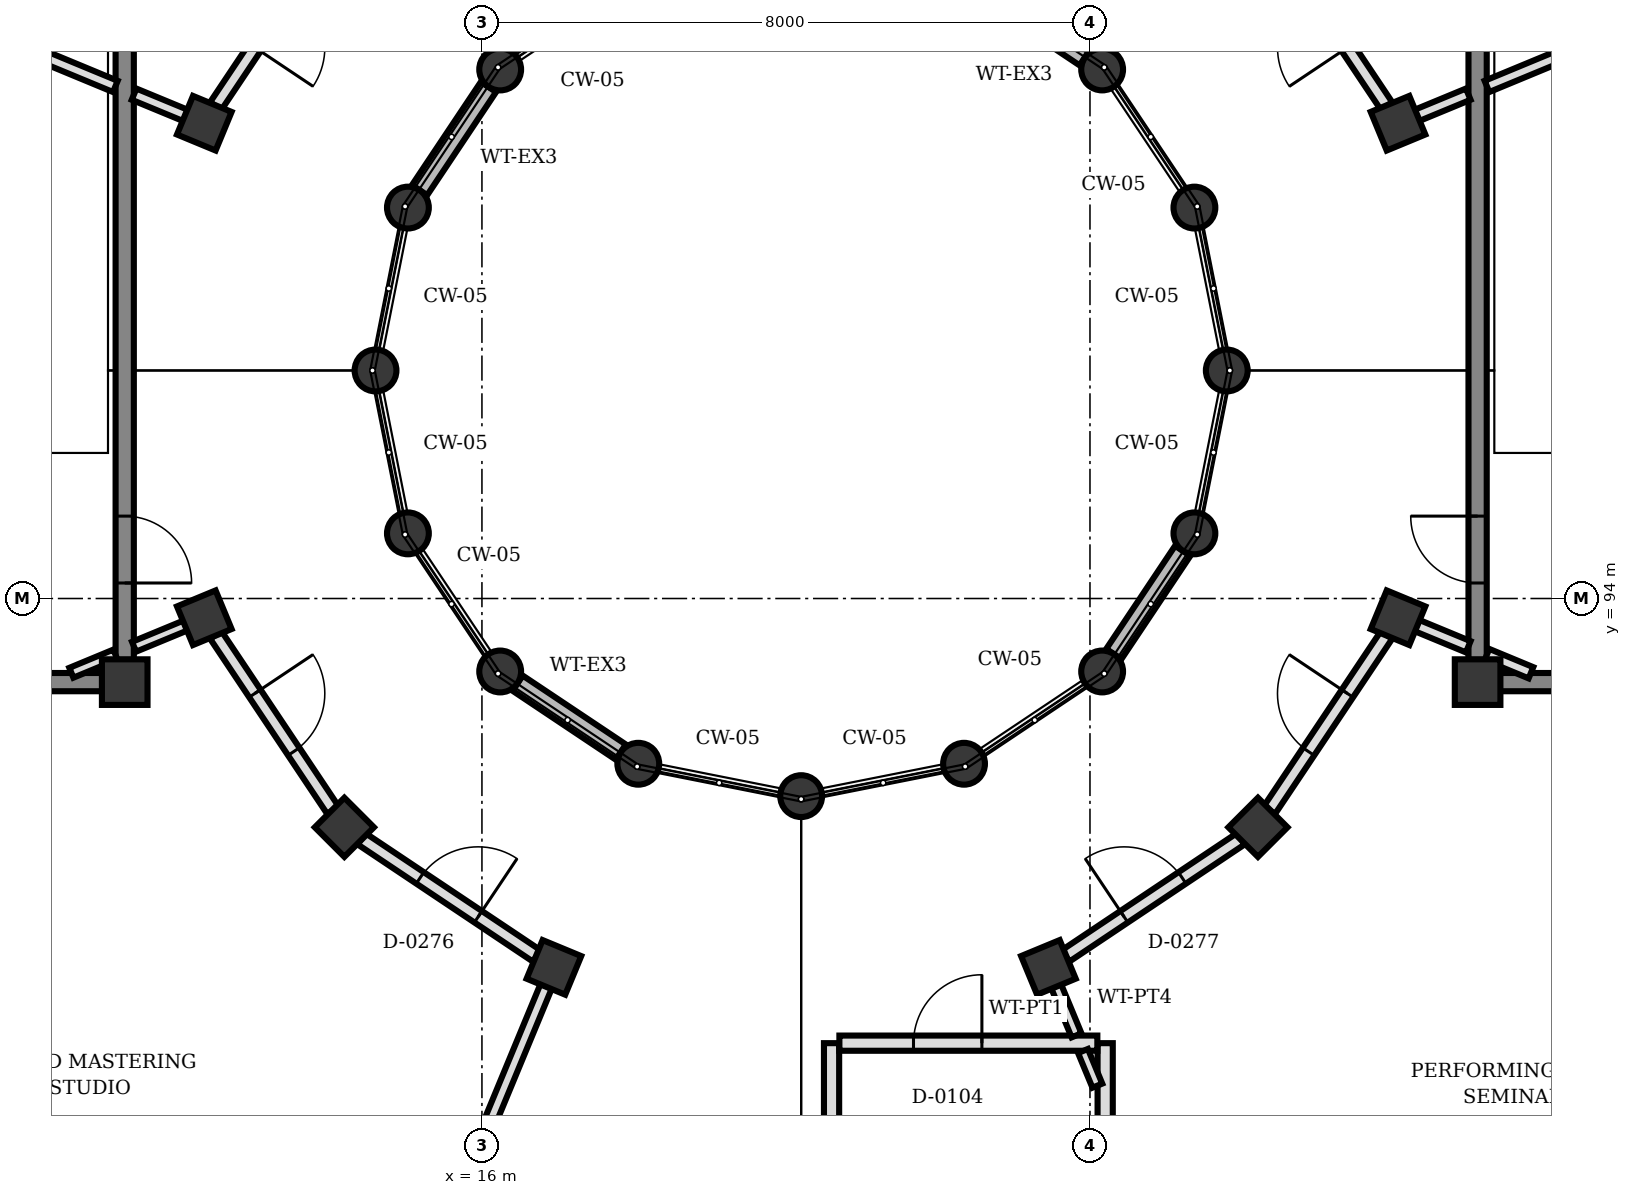
"""IFC4 building model, lengths in metres.
Left out: names, types, materials, properties, quantities, classifications, styles, units other than length and angle.
Written with IfcOpenShell. Run it as: python <this file> out.ifc"""

import sys

from ifc_helpers import new_model, si_unit, direction, frame, frame_2d, origin, origin_2d, place, context, subcontext, project, spatial, rectangle, circle, extrude, element, fill, save


model = new_model("IFC4")
c1 = context("Model", 3, precision=1e-05, world=origin(), true_north=direction((0.0, 1.0)))
c2 = subcontext(c1, "Body", "Model", "MODEL_VIEW")
j1 = project(units=[si_unit("LENGTHUNIT", "METRE"), si_unit("PLANEANGLEUNIT", "RADIAN")], contexts=[c1])
p1 = place(None, origin())
s1 = spatial("IfcSite", under=j1, at=p1, CompositionType="ELEMENT")
p2 = place(p1, origin())
s2 = spatial("IfcBuilding", under=s1, at=p2, CompositionType="ELEMENT")
p3 = place(p2, frame((0.0, 0.0, 12.5)))
s3 = spatial("IfcBuildingStorey", under=s2, at=p3, CompositionType="ELEMENT", Elevation=12.5)
for number, where, z_axis, x_axis in (
    (1, (11.3, 92.9, 0.0), (0.0, 0.0, 1.0), (1.0, 0.0, 0.0)),
    (2, (29.1, 92.9, 0.0), (0.0, 0.0, 1.0), (1.0, 0.0, 0.0)),
):
    element("IfcColumn", number, at=place(p3, frame(where, z_axis=z_axis, x_axis=x_axis)), inside=s3, PredefinedType="COLUMN", context=c2, shape_type="SweptSolid", body=[
        extrude(rectangle(XDim=0.6, YDim=0.6, at=origin_2d()), origin(), (0.0, 0.0, 1.0), 4.0),
    ])
for number, where, z_axis, x_axis in (
    (3, (25.8, 97.0, 0.0), (0.0, 0.0, 1.0), (1.0, 0.0, 0.0)),
    (4, (25.374, 99.143, 0.0), (0.0, 0.0, 1.0), (1.0, 0.0, 0.0)),
    (5, (24.16, 100.96, 0.0), (0.0, 0.0, 1.0), (1.0, 0.0, 0.0)),
    (6, (16.24, 100.96, 0.0), (0.0, 0.0, 1.0), (1.0, 0.0, 0.0)),
    (7, (15.026, 99.143, 0.0), (0.0, 0.0, 1.0), (1.0, 0.0, 0.0)),
    (8, (14.6, 97.0, 0.0), (0.0, 0.0, 1.0), (1.0, 0.0, 0.0)),
    (9, (15.026, 94.857, 0.0), (0.0, 0.0, 1.0), (1.0, 0.0, 0.0)),
    (10, (16.24, 93.04, 0.0), (0.0, 0.0, 1.0), (1.0, 0.0, 0.0)),
    (11, (18.057, 91.826, 0.0), (0.0, 0.0, 1.0), (1.0, 0.0, 0.0)),
    (12, (20.2, 91.4, 0.0), (0.0, 0.0, 1.0), (1.0, 0.0, 0.0)),
    (13, (22.343, 91.826, 0.0), (0.0, 0.0, 1.0), (1.0, 0.0, 0.0)),
    (14, (24.16, 93.04, 0.0), (0.0, 0.0, 1.0), (1.0, 0.0, 0.0)),
    (15, (25.374, 94.857, 0.0), (0.0, 0.0, 1.0), (1.0, 0.0, 0.0)),
):
    element("IfcColumn", number, at=place(p3, frame(where, z_axis=z_axis, x_axis=x_axis)), inside=s3, PredefinedType="COLUMN", context=c2, shape_type="SweptSolid", body=[
        extrude(circle(Radius=0.275, at=origin_2d()), origin(), (0.0, 0.0, 1.0), 3.765),
    ])
for number, where, z_axis, x_axis in (
    (16, (28.053, 100.253, 0.0), (0.0, 0.0, 1.0), (0.924, 0.383, 0.0)),
    (17, (12.347, 100.253, 0.0), (0.0, 0.0, 1.0), (-0.924, 0.383, 0.0)),
    (18, (12.347, 93.747, 0.0), (0.0, 0.0, 1.0), (-0.924, -0.383, 0.0)),
    (19, (14.19, 90.99, 0.0), (0.0, 0.0, 1.0), (-0.707, -0.707, 0.0)),
    (20, (16.947, 89.147, 0.0), (0.0, 0.0, 1.0), (-0.383, -0.924, 0.0)),
    (21, (23.453, 89.147, 0.0), (0.0, 0.0, 1.0), (0.383, -0.924, 0.0)),
    (22, (26.21, 90.99, 0.0), (0.0, 0.0, 1.0), (0.707, -0.707, 0.0)),
    (23, (28.053, 93.747, 0.0), (0.0, 0.0, 1.0), (0.924, -0.383, 0.0)),
):
    element("IfcColumn", number, at=place(p3, frame(where, z_axis=z_axis, x_axis=x_axis)), inside=s3, PredefinedType="COLUMN", context=c2, shape_type="SweptSolid", body=[
        extrude(rectangle(XDim=0.55, YDim=0.55, at=origin_2d()), origin(), (0.0, 0.0, 1.0), 4.49),
    ])
for number, where, z_axis, x_axis in (
    (24, (23.93, 101.114, 0.0), (0.0, 0.0, 1.0), (-0.832, 0.555, 0.0)),
    (25, (16.086, 100.73, 0.0), (0.0, 0.0, 1.0), (-0.555, -0.832, 0.0)),
    (26, (16.47, 92.886, 0.0), (0.0, 0.0, 1.0), (0.832, -0.555, 0.0)),
    (27, (24.314, 93.27, 0.0), (0.0, 0.0, 1.0), (0.555, 0.832, 0.0)),
):
    element("IfcWall", number, at=place(p3, frame(where, z_axis=z_axis, x_axis=x_axis)), inside=s3, PredefinedType="SOLIDWALL", context=c2, shape_type="SweptSolid", body=[
        extrude(rectangle(XDim=1.632, YDim=0.24, at=frame_2d((0.816, 0.0))), origin(), (0.0, 0.0, 1.0), 3.275),
    ])
p4 = place(p3, frame((11.3, 101.328, 0.0), z_axis=(0.0, 0.0, 1.0), x_axis=(0.0, -1.0, 0.0)))
e28 = element("IfcWall", 28, at=p4, inside=s3, PredefinedType="SHEAR", context=c2, shape_type="SweptSolid", body=[
    extrude(rectangle(XDim=8.136, YDim=0.24, at=frame_2d((4.068, 0.0))), origin(), (0.0, 0.0, 1.0), 3.74),
])
p5 = place(p4, frame((6.244, 0.0, 0.0)))
e29 = element("IfcOpeningElement", 29, at=p5, cuts=e28, PredefinedType="OPENING", context=c2, shape_type="SweptSolid", body=[
    extrude(rectangle(XDim=0.88, YDim=2.1, at=frame_2d((0.44, 1.05))), frame((0.0, 0.13, 0.0), z_axis=(0.0, -1.0, 0.0), x_axis=(1.0, 0.0, 0.0)), (0.0, 0.0, 1.0), 0.26),
])
p6 = place(p3, frame((11.008, 92.9, 0.0), z_axis=(0.0, 0.0, 1.0), x_axis=(-1.0, 0.0, 0.0)))
e30 = element("IfcWall", 30, at=p6, inside=s3, PredefinedType="SHEAR", context=c2, shape_type="SweptSolid", body=[
    extrude(rectangle(XDim=4.216, YDim=0.24, at=frame_2d((2.108, 0.0))), origin(), (0.0, 0.0, 1.0), 3.74),
])
p7 = place(p3, frame((29.1, 93.192, 0.0), z_axis=(0.0, 0.0, 1.0), x_axis=(0.0, 1.0, 0.0)))
e31 = element("IfcWall", 31, at=p7, inside=s3, PredefinedType="SHEAR", context=c2, shape_type="SweptSolid", body=[
    extrude(rectangle(XDim=8.136, YDim=0.24, at=frame_2d((4.068, 0.0))), origin(), (0.0, 0.0, 1.0), 3.74),
])
p8 = place(p7, frame((1.012, 0.0, 0.0)))
e32 = element("IfcOpeningElement", 32, at=p8, cuts=e31, PredefinedType="OPENING", context=c2, shape_type="SweptSolid", body=[
    extrude(rectangle(XDim=0.88, YDim=2.1, at=frame_2d((0.44, 1.05))), frame((0.0, 0.13, 0.0), z_axis=(0.0, -1.0, 0.0), x_axis=(1.0, 0.0, 0.0)), (0.0, 0.0, 1.0), 0.26),
])
p9 = place(p3, frame((33.608, 92.9, 0.0), z_axis=(0.0, 0.0, 1.0), x_axis=(-1.0, 0.0, 0.0)))
e33 = element("IfcWall", 33, at=p9, inside=s3, PredefinedType="SHEAR", context=c2, shape_type="SweptSolid", body=[
    extrude(rectangle(XDim=4.216, YDim=0.24, at=frame_2d((2.108, 0.0))), origin(), (0.0, 0.0, 1.0), 3.74),
])
p10 = place(p3, frame((20.6, 84.867, 0.0), z_axis=(0.0, 0.0, 1.0), x_axis=(0.0, 1.0, 0.0)))
e34 = element("IfcWall", 34, at=p10, inside=s3, PredefinedType="PARTITIONING", context=c2, shape_type="SweptSolid", body=[
    extrude(rectangle(XDim=3.283, YDim=0.2, at=frame_2d((1.642, 0.0))), origin(), (0.0, 0.0, 1.0), 3.7),
])
p11 = place(p3, frame((24.2, 84.703, 0.0), z_axis=(0.0, 0.0, 1.0), x_axis=(0.0, 1.0, 0.0)))
e35 = element("IfcWall", 35, at=p11, inside=s3, PredefinedType="PARTITIONING", context=c2, shape_type="SweptSolid", body=[
    extrude(rectangle(XDim=3.447, YDim=0.2, at=frame_2d((1.724, 0.0))), origin(), (0.0, 0.0, 1.0), 3.7),
])
p12 = place(p3, frame((20.703, 88.15, 0.0), z_axis=(0.0, 0.0, 1.0), x_axis=(1.0, 0.0, 0.0)))
e36 = element("IfcWall", 36, at=p12, inside=s3, PredefinedType="PARTITIONING", context=c2, shape_type="SweptSolid", body=[
    extrude(rectangle(XDim=3.394, YDim=0.2, at=frame_2d((1.697, 0.0))), origin(), (0.0, 0.0, 1.0), 3.7),
])
p13 = place(p12, frame((0.975, 0.0, 0.0)))
e37 = element("IfcOpeningElement", 37, at=p13, cuts=e36, PredefinedType="OPENING", context=c2, shape_type="SweptSolid", body=[
    extrude(rectangle(XDim=0.9, YDim=2.2, at=frame_2d((0.45, 1.1))), frame((0.0, 0.11, 0.0), z_axis=(0.0, -1.0, 0.0), x_axis=(1.0, 0.0, 0.0)), (0.0, 0.0, 1.0), 0.22),
])
p14 = place(p3, frame((28.3, 100.355, 0.0), z_axis=(0.0, 0.0, 1.0), x_axis=(0.924069600435, 0.382224245113, 0.0)))
e38 = element("IfcWall", 38, at=p14, inside=s3, PredefinedType="PARTITIONING", context=c2, shape_type="SweptSolid", body=[
    extrude(rectangle(XDim=0.733, YDim=0.16, at=frame_2d((0.366, 0.0))), origin(), (0.0, 0.0, 1.0), 3.7),
])
p15 = place(p3, frame((29.223, 100.737, 0.0), z_axis=(0.0, 0.0, 1.0), x_axis=(0.923817443679, 0.382833293686, 0.0)))
e39 = element("IfcWall", 39, at=p15, inside=s3, PredefinedType="PARTITIONING", context=c2, shape_type="SweptSolid", body=[
    extrude(rectangle(XDim=1.985, YDim=0.16, at=frame_2d((0.993, 0.0))), origin(), (0.0, 0.0, 1.0), 3.7),
])
p16 = place(p3, frame((12.1, 100.355, 0.0), z_axis=(0.0, 0.0, 1.0), x_axis=(-0.924069600435, 0.382224245113, 0.0)))
e40 = element("IfcWall", 40, at=p16, inside=s3, PredefinedType="PARTITIONING", context=c2, shape_type="SweptSolid", body=[
    extrude(rectangle(XDim=0.733, YDim=0.16, at=frame_2d((0.366, 0.0))), origin(), (0.0, 0.0, 1.0), 3.7),
])
p17 = place(p3, frame((11.177, 100.737, 0.0), z_axis=(0.0, 0.0, 1.0), x_axis=(-0.923817443679, 0.382833293686, 0.0)))
e41 = element("IfcWall", 41, at=p17, inside=s3, PredefinedType="PARTITIONING", context=c2, shape_type="SweptSolid", body=[
    extrude(rectangle(XDim=1.985, YDim=0.16, at=frame_2d((0.993, 0.0))), origin(), (0.0, 0.0, 1.0), 3.7),
])
p18 = place(p3, frame((12.1, 93.645, 0.0), z_axis=(0.0, 0.0, 1.0), x_axis=(-0.924069600435, -0.382224245113, 0.0)))
e42 = element("IfcWall", 42, at=p18, inside=s3, PredefinedType="PARTITIONING", context=c2, shape_type="SweptSolid", body=[
    extrude(rectangle(XDim=0.733, YDim=0.14, at=frame_2d((0.366, 0.0))), origin(), (0.0, 0.0, 1.0), 3.7),
])
p19 = place(p3, frame((11.177, 93.263, 0.0), z_axis=(0.0, 0.0, 1.0), x_axis=(-0.923812676193, -0.382844797933, 0.0)))
e43 = element("IfcWall", 43, at=p19, inside=s3, PredefinedType="PARTITIONING", context=c2, shape_type="SweptSolid", body=[
    extrude(rectangle(XDim=0.627, YDim=0.14, at=frame_2d((0.313, 0.0))), origin(), (0.0, 0.0, 1.0), 3.7),
])
p20 = place(p3, frame((16.845, 88.9, 0.0), z_axis=(0.0, 0.0, 1.0), x_axis=(-0.382683896966, -0.923879340067, 0.0)))
e44 = element("IfcWall", 44, at=p20, inside=s3, PredefinedType="PARTITIONING", context=c2, shape_type="SweptSolid", body=[
    extrude(rectangle(XDim=8.44, YDim=0.16, at=frame_2d((4.22, 0.0))), origin(), (0.0, 0.0, 1.0), 3.7),
])
p21 = place(p3, frame((23.555, 88.9, 0.0), z_axis=(0.0, 0.0, 1.0), x_axis=(0.38278283439, -0.923838352579, 0.0)))
e45 = element("IfcWall", 45, at=p21, inside=s3, PredefinedType="PARTITIONING", context=c2, shape_type="SweptSolid", body=[
    extrude(rectangle(XDim=0.7, YDim=0.14, at=frame_2d((0.35, 0.0))), origin(), (0.0, 0.0, 1.0), 3.7),
])
p22 = place(p3, frame((23.908, 88.047, 0.0), z_axis=(0.0, 0.0, 1.0), x_axis=(0.3827885685, -0.92383597669, 0.0)))
e46 = element("IfcWall", 46, at=p22, inside=s3, PredefinedType="PARTITIONING", context=c2, shape_type="SweptSolid", body=[
    extrude(rectangle(XDim=0.494, YDim=0.14, at=frame_2d((0.247, 0.0))), origin(), (0.0, 0.0, 1.0), 3.7),
])
p23 = place(p3, frame((28.3, 93.645, 0.0), z_axis=(0.0, 0.0, 1.0), x_axis=(0.924069600435, -0.382224245113, 0.0)))
e47 = element("IfcWall", 47, at=p23, inside=s3, PredefinedType="PARTITIONING", context=c2, shape_type="SweptSolid", body=[
    extrude(rectangle(XDim=0.733, YDim=0.16, at=frame_2d((0.366, 0.0))), origin(), (0.0, 0.0, 1.0), 3.7),
])
p24 = place(p3, frame((29.223, 93.263, 0.0), z_axis=(0.0, 0.0, 1.0), x_axis=(0.923812676193, -0.382844797933, 0.0)))
e48 = element("IfcWall", 48, at=p24, inside=s3, PredefinedType="PARTITIONING", context=c2, shape_type="SweptSolid", body=[
    extrude(rectangle(XDim=0.627, YDim=0.16, at=frame_2d((0.313, 0.0))), origin(), (0.0, 0.0, 1.0), 3.7),
])
p25 = place(p3, frame((27.902, 100.479, 0.0), z_axis=(0.0, 0.0, 1.0), x_axis=(-0.555797002478, 0.831318045056, 0.0)))
e49 = element("IfcWall", 49, at=p25, inside=s3, PredefinedType="PARTITIONING", context=c2, shape_type="SweptSolid", body=[
    extrude(rectangle(XDim=2.773, YDim=0.18, at=frame_2d((1.386, 0.0))), origin(), (0.0, 0.0, 1.0), 3.7),
])
p26 = place(p25, frame((0.926, 0.0, 0.0)))
e50 = element("IfcOpeningElement", 50, at=p26, cuts=e49, PredefinedType="OPENING", context=c2, shape_type="SweptSolid", body=[
    extrude(rectangle(XDim=0.92, YDim=2.1, at=frame_2d((0.46, 1.05))), frame((0.0, 0.1, 0.0), z_axis=(0.0, -1.0, 0.0), x_axis=(1.0, 0.0, 0.0)), (0.0, 0.0, 1.0), 0.2),
])
p27 = place(p3, frame((14.039, 102.784, 0.0), z_axis=(0.0, 0.0, 1.0), x_axis=(-0.555797002478, -0.831318045056, 0.0)))
e51 = element("IfcWall", 51, at=p27, inside=s3, PredefinedType="PARTITIONING", context=c2, shape_type="SweptSolid", body=[
    extrude(rectangle(XDim=2.773, YDim=0.18, at=frame_2d((1.386, 0.0))), origin(), (0.0, 0.0, 1.0), 3.7),
])
p28 = place(p27, frame((0.926, 0.0, 0.0)))
e52 = element("IfcOpeningElement", 52, at=p28, cuts=e51, PredefinedType="OPENING", context=c2, shape_type="SweptSolid", body=[
    extrude(rectangle(XDim=0.92, YDim=2.1, at=frame_2d((0.46, 1.05))), frame((0.0, 0.1, 0.0), z_axis=(0.0, -1.0, 0.0), x_axis=(1.0, 0.0, 0.0)), (0.0, 0.0, 1.0), 0.2),
])
p29 = place(p3, frame((12.498, 93.521, 0.0), z_axis=(0.0, 0.0, 1.0), x_axis=(0.555797002478, -0.831318045056, 0.0)))
e53 = element("IfcWall", 53, at=p29, inside=s3, PredefinedType="PARTITIONING", context=c2, shape_type="SweptSolid", body=[
    extrude(rectangle(XDim=2.773, YDim=0.18, at=frame_2d((1.386, 0.0))), origin(), (0.0, 0.0, 1.0), 3.7),
])
p30 = place(p29, frame((0.926, 0.0, 0.0)))
e54 = element("IfcOpeningElement", 54, at=p30, cuts=e53, PredefinedType="OPENING", context=c2, shape_type="SweptSolid", body=[
    extrude(rectangle(XDim=0.92, YDim=2.1, at=frame_2d((0.46, 1.05))), frame((0.0, 0.1, 0.0), z_axis=(0.0, -1.0, 0.0), x_axis=(1.0, 0.0, 0.0)), (0.0, 0.0, 1.0), 0.2),
])
p31 = place(p3, frame((14.416, 90.839, 0.0), z_axis=(0.0, 0.0, 1.0), x_axis=(0.831318045056, -0.555797002478, 0.0)))
e55 = element("IfcWall", 55, at=p31, inside=s3, PredefinedType="PARTITIONING", context=c2, shape_type="SweptSolid", body=[
    extrude(rectangle(XDim=2.773, YDim=0.18, at=frame_2d((1.386, 0.0))), origin(), (0.0, 0.0, 1.0), 3.7),
])
p32 = place(p31, frame((0.926, 0.0, 0.0)))
e56 = element("IfcOpeningElement", 56, at=p32, cuts=e55, PredefinedType="OPENING", context=c2, shape_type="SweptSolid", body=[
    extrude(rectangle(XDim=0.92, YDim=2.1, at=frame_2d((0.46, 1.05))), frame((0.0, 0.1, 0.0), z_axis=(0.0, -1.0, 0.0), x_axis=(1.0, 0.0, 0.0)), (0.0, 0.0, 1.0), 0.2),
])
p33 = place(p3, frame((23.679, 89.298, 0.0), z_axis=(0.0, 0.0, 1.0), x_axis=(0.831318045056, 0.555797002478, 0.0)))
e57 = element("IfcWall", 57, at=p33, inside=s3, PredefinedType="PARTITIONING", context=c2, shape_type="SweptSolid", body=[
    extrude(rectangle(XDim=2.773, YDim=0.18, at=frame_2d((1.386, 0.0))), origin(), (0.0, 0.0, 1.0), 3.7),
])
p34 = place(p33, frame((0.926, 0.0, 0.0)))
e58 = element("IfcOpeningElement", 58, at=p34, cuts=e57, PredefinedType="OPENING", context=c2, shape_type="SweptSolid", body=[
    extrude(rectangle(XDim=0.92, YDim=2.1, at=frame_2d((0.46, 1.05))), frame((0.0, 0.1, 0.0), z_axis=(0.0, -1.0, 0.0), x_axis=(1.0, 0.0, 0.0)), (0.0, 0.0, 1.0), 0.2),
])
p35 = place(p3, frame((26.361, 91.216, 0.0), z_axis=(0.0, 0.0, 1.0), x_axis=(0.555797002478, 0.831318045056, 0.0)))
e59 = element("IfcWall", 59, at=p35, inside=s3, PredefinedType="PARTITIONING", context=c2, shape_type="SweptSolid", body=[
    extrude(rectangle(XDim=2.773, YDim=0.18, at=frame_2d((1.386, 0.0))), origin(), (0.0, 0.0, 1.0), 3.7),
])
p36 = place(p35, frame((0.926, 0.0, 0.0)))
e60 = element("IfcOpeningElement", 60, at=p36, cuts=e59, PredefinedType="OPENING", context=c2, shape_type="SweptSolid", body=[
    extrude(rectangle(XDim=0.92, YDim=2.1, at=frame_2d((0.46, 1.05))), frame((0.0, 0.1, 0.0), z_axis=(0.0, -1.0, 0.0), x_axis=(1.0, 0.0, 0.0)), (0.0, 0.0, 1.0), 0.2),
])
p37 = place(p5, origin())
e61 = element("IfcDoor", 61, at=p37, inside=s3, OperationType="SINGLE_SWING_RIGHT", PredefinedType="DOOR", context=c2, shape_type="SweptSolid", body=[
    extrude(rectangle(XDim=0.88, YDim=2.1, at=frame_2d((0.44, 1.05))), frame((0.0, 0.025, 0.0), z_axis=(0.0, -1.0, 0.0), x_axis=(1.0, 0.0, 0.0)), (0.0, 0.0, 1.0), 0.05),
])
fill(e29, e61)
p38 = place(p8, origin())
e62 = element("IfcDoor", 62, at=p38, inside=s3, OperationType="SINGLE_SWING_RIGHT", PredefinedType="DOOR", context=c2, shape_type="SweptSolid", body=[
    extrude(rectangle(XDim=0.88, YDim=2.1, at=frame_2d((0.44, 1.05))), frame((0.0, 0.025, 0.0), z_axis=(0.0, -1.0, 0.0), x_axis=(1.0, 0.0, 0.0)), (0.0, 0.0, 1.0), 0.05),
])
fill(e32, e62)
p39 = place(p13, origin())
e63 = element("IfcDoor", 63, at=p39, inside=s3, OperationType="SINGLE_SWING_RIGHT", PredefinedType="DOOR", context=c2, shape_type="SweptSolid", body=[
    extrude(rectangle(XDim=0.9, YDim=2.2, at=frame_2d((0.45, 1.1))), frame((0.0, 0.025, 0.0), z_axis=(0.0, -1.0, 0.0), x_axis=(1.0, 0.0, 0.0)), (0.0, 0.0, 1.0), 0.05),
])
fill(e37, e63)
p40 = place(p30, origin())
e64 = element("IfcDoor", 64, at=p40, inside=s3, OperationType="SINGLE_SWING_LEFT", PredefinedType="DOOR", context=c2, shape_type="SweptSolid", body=[
    extrude(rectangle(XDim=0.92, YDim=2.1, at=frame_2d((0.46, 1.05))), frame((0.0, 0.025, 0.0), z_axis=(0.0, -1.0, 0.0), x_axis=(1.0, 0.0, 0.0)), (0.0, 0.0, 1.0), 0.05),
])
fill(e54, e64)
p41 = place(p32, origin())
e65 = element("IfcDoor", 65, at=p41, inside=s3, OperationType="SINGLE_SWING_RIGHT", PredefinedType="DOOR", context=c2, shape_type="SweptSolid", body=[
    extrude(rectangle(XDim=0.92, YDim=2.1, at=frame_2d((0.46, 1.05))), frame((0.0, 0.025, 0.0), z_axis=(0.0, -1.0, 0.0), x_axis=(1.0, 0.0, 0.0)), (0.0, 0.0, 1.0), 0.05),
])
fill(e56, e65)
p42 = place(p34, origin())
e66 = element("IfcDoor", 66, at=p42, inside=s3, OperationType="SINGLE_SWING_LEFT", PredefinedType="DOOR", context=c2, shape_type="SweptSolid", body=[
    extrude(rectangle(XDim=0.92, YDim=2.1, at=frame_2d((0.46, 1.05))), frame((0.0, 0.025, 0.0), z_axis=(0.0, -1.0, 0.0), x_axis=(1.0, 0.0, 0.0)), (0.0, 0.0, 1.0), 0.05),
])
fill(e58, e66)
p43 = place(p36, origin())
e67 = element("IfcDoor", 67, at=p43, inside=s3, OperationType="SINGLE_SWING_RIGHT", PredefinedType="DOOR", context=c2, shape_type="SweptSolid", body=[
    extrude(rectangle(XDim=0.92, YDim=2.1, at=frame_2d((0.46, 1.05))), frame((0.0, 0.025, 0.0), z_axis=(0.0, -1.0, 0.0), x_axis=(1.0, 0.0, 0.0)), (0.0, 0.0, 1.0), 0.05),
])
fill(e60, e67)
save(model, sys.argv[1])
